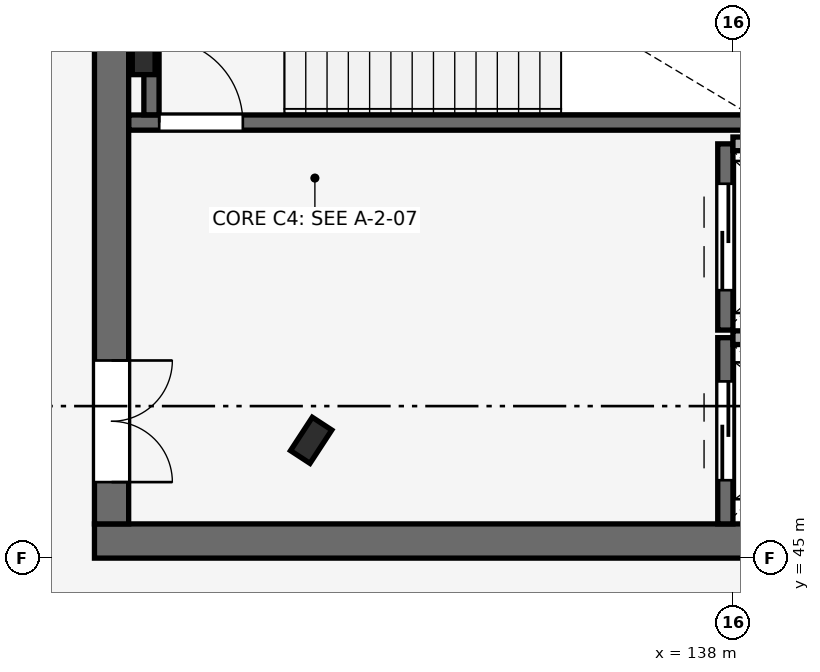
"""IFC4 building model, lengths in metres.
Left out: names, types, materials, properties, quantities, classifications, styles, units other than length and angle.
Written with IfcOpenShell. Run it as: python <this file> out.ifc"""

import sys

from ifc_helpers import new_model, si_unit, direction, frame, frame_2d, origin, origin_2d, place, context, subcontext, project, spatial, rectangle, i_section, extrude, element, fill, save


model = new_model("IFC4")
c1 = context("Model", 3, precision=1e-05, world=origin(), true_north=direction((0.0, 1.0)))
c2 = subcontext(c1, "Body", "Model", "MODEL_VIEW")
j1 = project(units=[si_unit("LENGTHUNIT", "METRE"), si_unit("PLANEANGLEUNIT", "RADIAN")], contexts=[c1])
p1 = place(None, origin())
s1 = spatial("IfcSite", under=j1, at=p1, CompositionType="ELEMENT")
p2 = place(p1, origin())
s2 = spatial("IfcBuilding", under=s1, at=p2, CompositionType="ELEMENT")
p3 = place(p2, frame((0.0, 0.0, 10.2)))
s3 = spatial("IfcBuildingStorey", under=s2, at=p3, CompositionType="ELEMENT", Elevation=10.2)
p4 = place(p3, frame((132.451, 46.55, 0.0), z_axis=(0.0, 0.0, 1.0), x_axis=(0.836955398099, -0.547271104292, 0.0)))
e1 = element("IfcColumn", 1, at=p4, inside=s3, PredefinedType="COLUMN", context=c2, shape_type="SweptSolid", body=[
    extrude(i_section(OverallWidth=0.306, OverallDepth=0.524, WebThickness=0.021, FlangeThickness=0.04, FilletRadius=0.027, at=origin_2d()), origin(), (0.0, 0.0, 1.0), 4.8),
])
p5 = place(p3, frame((129.6, 45.225, 0.0), z_axis=(0.0, 0.0, 1.0), x_axis=(1.0, 0.0, 0.0)))
e2 = element("IfcWall", 2, at=p5, inside=s3, PredefinedType="SHEAR", context=c2, shape_type="SweptSolid", body=[
    extrude(rectangle(XDim=11.4, YDim=0.45, at=frame_2d((5.7, 0.0))), origin(), (0.0, 0.0, 1.0), 4.8),
])
p6 = place(p3, frame((129.825, 45.45, 0.0), z_axis=(0.0, 0.0, 1.0), x_axis=(0.0, 1.0, 0.0)))
e3 = element("IfcWall", 3, at=p6, inside=s3, PredefinedType="SHEAR", context=c2, shape_type="SweptSolid", body=[
    extrude(rectangle(XDim=9.1, YDim=0.45, at=frame_2d((4.55, 0.0))), origin(), (0.0, 0.0, 1.0), 4.8),
])
p7 = place(p6, frame((0.55, 0.0, 0.0)))
e4 = element("IfcOpeningElement", 4, at=p7, cuts=e3, PredefinedType="OPENING", context=c2, shape_type="SweptSolid", body=[
    extrude(rectangle(XDim=1.6, YDim=2.2, at=frame_2d((0.8, 1.1))), frame((0.0, 0.235, 0.0), z_axis=(0.0, -1.0, 0.0), x_axis=(1.0, 0.0, 0.0)), (0.0, 0.0, 1.0), 0.47),
])
p8 = place(p3, frame((130.248, 51.611, 0.0), z_axis=(0.0, 0.0, 1.0), x_axis=(1.0, 0.0, 0.0)))
e5 = element("IfcColumn", 5, at=p8, inside=s3, PredefinedType="COLUMN", context=c2, shape_type="SweptSolid", body=[
    extrude(i_section(OverallWidth=0.3, OverallDepth=0.5, WebThickness=0.014, FlangeThickness=0.028, FilletRadius=0.027, at=origin_2d()), origin(), (0.0, 0.0, 1.0), 4.8),
])
p9 = place(p3, frame((137.9, 45.45, 0.0), z_axis=(0.0, 0.0, 1.0), x_axis=(0.0, 1.0, 0.0)))
e6 = element("IfcWall", 6, at=p9, inside=s3, PredefinedType="SHEAR", context=c2, shape_type="SweptSolid", body=[
    extrude(rectangle(XDim=2.45, YDim=0.2, at=frame_2d((1.225, 0.0))), origin(), (0.0, 0.0, 1.0), 4.52),
])
p10 = place(p9, frame((0.575, 0.0, 0.0)))
e7 = element("IfcOpeningElement", 7, at=p10, cuts=e6, PredefinedType="OPENING", context=c2, shape_type="SweptSolid", body=[
    extrude(rectangle(XDim=1.3, YDim=2.2, at=frame_2d((0.65, 1.1))), frame((0.0, 0.11, 0.0), z_axis=(0.0, -1.0, 0.0), x_axis=(1.0, 0.0, 0.0)), (0.0, 0.0, 1.0), 0.22),
])
p11 = place(p3, frame((138.0, 47.9, 0.0), z_axis=(0.0, 0.0, 1.0), x_axis=(1.0, 0.0, 0.0)))
e8 = element("IfcWall", 8, at=p11, inside=s3, PredefinedType="PARTITIONING", context=c2, shape_type="SweptSolid", body=[
    extrude(rectangle(XDim=2.45, YDim=0.18, at=frame_2d((1.225, 0.0))), origin(), (0.0, 0.0, 1.0), 4.8),
])
p12 = place(p3, frame((137.9, 48.0, 0.0), z_axis=(0.0, 0.0, 1.0), x_axis=(0.0, 1.0, 0.0)))
e9 = element("IfcWall", 9, at=p12, inside=s3, PredefinedType="SHEAR", context=c2, shape_type="SweptSolid", body=[
    extrude(rectangle(XDim=2.45, YDim=0.2, at=frame_2d((1.225, 0.0))), origin(), (0.0, 0.0, 1.0), 4.52),
])
p13 = place(p12, frame((0.525, 0.0, 0.0)))
e10 = element("IfcOpeningElement", 10, at=p13, cuts=e9, PredefinedType="OPENING", context=c2, shape_type="SweptSolid", body=[
    extrude(rectangle(XDim=1.4, YDim=2.2, at=frame_2d((0.7, 1.1))), frame((0.0, 0.11, 0.0), z_axis=(0.0, -1.0, 0.0), x_axis=(1.0, 0.0, 0.0)), (0.0, 0.0, 1.0), 0.22),
])
p14 = place(p3, frame((138.0, 50.45, 0.0), z_axis=(0.0, 0.0, 1.0), x_axis=(1.0, 0.0, 0.0)))
e11 = element("IfcWall", 11, at=p14, inside=s3, PredefinedType="PARTITIONING", context=c2, shape_type="SweptSolid", body=[
    extrude(rectangle(XDim=2.45, YDim=0.18, at=frame_2d((1.225, 0.0))), origin(), (0.0, 0.0, 1.0), 4.8),
])
p15 = place(p3, frame((130.052, 50.73, 0.0), z_axis=(0.0, 0.0, 1.0), x_axis=(1.0, 0.0, 0.0)))
e12 = element("IfcWall", 12, at=p15, inside=s3, PredefinedType="SHEAR", context=c2, shape_type="SweptSolid", body=[
    extrude(rectangle(XDim=8.248, YDim=0.2, at=frame_2d((4.124, 0.0))), origin(), (0.0, 0.0, 1.0), 4.8),
])
p16 = place(p15, frame((0.4, 0.0, 0.0)))
e13 = element("IfcOpeningElement", 13, at=p16, cuts=e12, PredefinedType="OPENING", context=c2, shape_type="SweptSolid", body=[
    extrude(rectangle(XDim=1.1, YDim=2.15, at=frame_2d((0.55, 1.075))), frame((0.0, 0.11, 0.0), z_axis=(0.0, -1.0, 0.0), x_axis=(1.0, 0.0, 0.0)), (0.0, 0.0, 1.0), 0.22),
])
p17 = place(p3, frame((130.35, 50.832, 0.0), z_axis=(0.0, 0.0, 1.0), x_axis=(0.0, 1.0, 0.0)))
e14 = element("IfcWall", 14, at=p17, inside=s3, PredefinedType="SHEAR", context=c2, shape_type="SweptSolid", body=[
    extrude(rectangle(XDim=3.686, YDim=0.2, at=frame_2d((1.843, 0.0))), origin(), (0.0, 0.0, 1.0), 4.8),
])
p18 = place(p10, origin())
e15 = element("IfcDoor", 15, at=p18, inside=s3, OperationType="DOUBLE_DOOR_SLIDING", PredefinedType="DOOR", context=c2, shape_type="SweptSolid", body=[
    extrude(rectangle(XDim=1.3, YDim=2.2, at=frame_2d((0.65, 1.1))), frame((0.0, 0.025, 0.0), z_axis=(0.0, -1.0, 0.0), x_axis=(1.0, 0.0, 0.0)), (0.0, 0.0, 1.0), 0.05),
])
fill(e7, e15)
p19 = place(p13, origin())
e16 = element("IfcDoor", 16, at=p19, inside=s3, OperationType="DOUBLE_DOOR_SLIDING", PredefinedType="DOOR", context=c2, shape_type="SweptSolid", body=[
    extrude(rectangle(XDim=1.4, YDim=2.2, at=frame_2d((0.7, 1.1))), frame((0.0, 0.025, 0.0), z_axis=(0.0, -1.0, 0.0), x_axis=(1.0, 0.0, 0.0)), (0.0, 0.0, 1.0), 0.05),
])
fill(e10, e16)
p20 = place(p16, frame((1.1, 0.0, 0.0), z_axis=(0.0, 0.0, 1.0), x_axis=(-1.0, 0.0, 0.0)))
e17 = element("IfcDoor", 17, at=p20, inside=s3, OperationType="SINGLE_SWING_RIGHT", PredefinedType="DOOR", context=c2, shape_type="SweptSolid", body=[
    extrude(rectangle(XDim=1.1, YDim=2.15, at=frame_2d((0.55, 1.075))), frame((0.0, 0.025, 0.0), z_axis=(0.0, -1.0, 0.0), x_axis=(1.0, 0.0, 0.0)), (0.0, 0.0, 1.0), 0.05),
])
fill(e13, e17)
p21 = place(p7, frame((1.6, 0.0, 0.0), z_axis=(0.0, 0.0, 1.0), x_axis=(-1.0, 0.0, 0.0)))
e18 = element("IfcDoor", 18, at=p21, inside=s3, OperationType="DOUBLE_DOOR_SINGLE_SWING", PredefinedType="DOOR", context=c2, shape_type="SweptSolid", body=[
    extrude(rectangle(XDim=1.6, YDim=2.2, at=frame_2d((0.8, 1.1))), frame((0.0, 0.025, 0.0), z_axis=(0.0, -1.0, 0.0), x_axis=(1.0, 0.0, 0.0)), (0.0, 0.0, 1.0), 0.05),
])
fill(e4, e18)
save(model, sys.argv[1])
